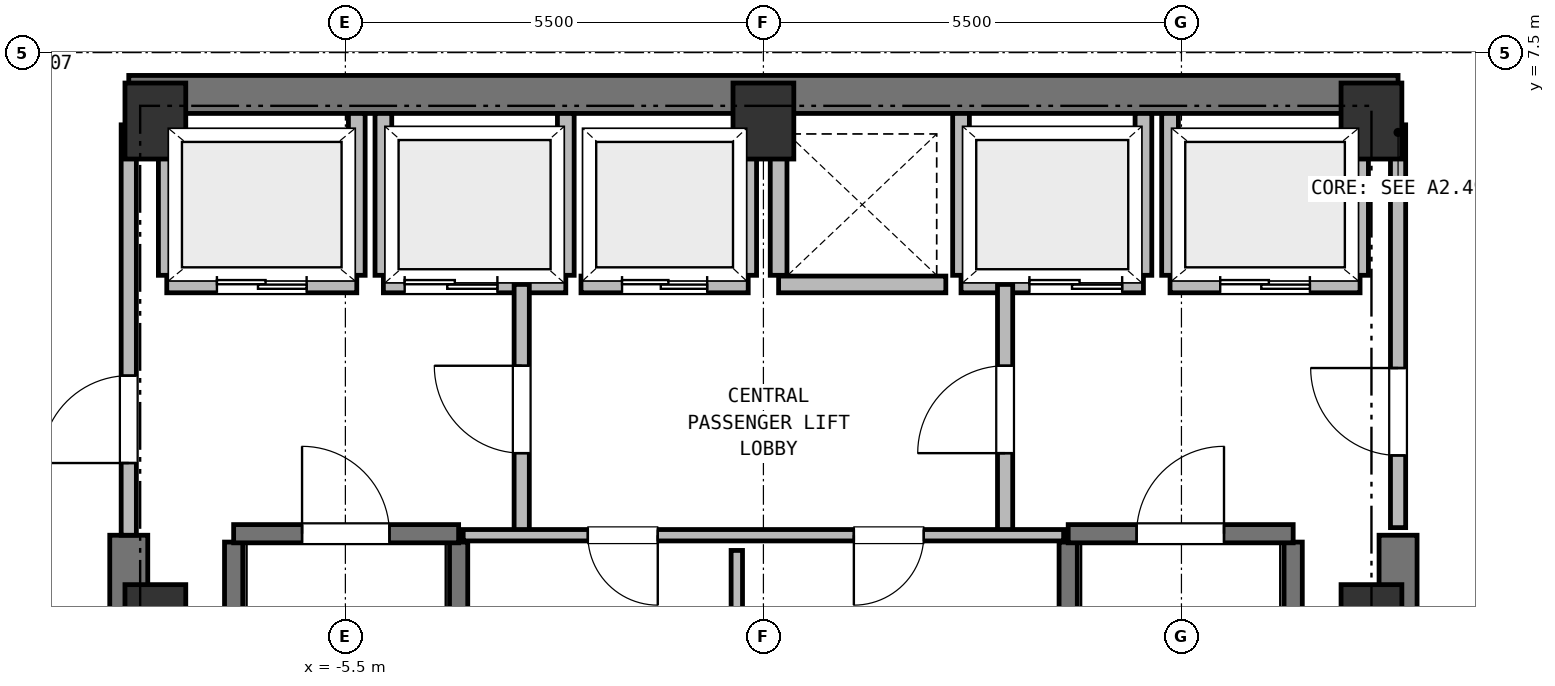
"""IFC4 building model, lengths in metres.
Left out: names, types, materials, properties, quantities, classifications, styles, units other than length and angle.
Written with IfcOpenShell. Run it as: python <this file> out.ifc"""

import sys

from ifc_helpers import new_model, si_unit, direction, frame, frame_2d, origin, origin_2d, place, context, subcontext, project, spatial, rectangle, extrude, element, fill, save


model = new_model("IFC4")
c1 = context("Model", 3, precision=1e-05, world=origin(), true_north=direction((0.0, 1.0)))
c2 = subcontext(c1, "Body", "Model", "MODEL_VIEW")
j1 = project(units=[si_unit("LENGTHUNIT", "METRE"), si_unit("PLANEANGLEUNIT", "RADIAN")], contexts=[c1])
p1 = place(None, origin())
s1 = spatial("IfcSite", under=j1, at=p1, CompositionType="ELEMENT")
p2 = place(p1, origin())
s2 = spatial("IfcBuilding", under=s1, at=p2, CompositionType="ELEMENT")
p3 = place(p2, frame((0.0, 0.0, 182.75)))
s3 = spatial("IfcBuildingStorey", under=s2, at=p3, CompositionType="ELEMENT", Elevation=182.75)
for number, where, z_axis, x_axis in (
    (1, (8.0, 0.0, 0.0), (0.0, 0.0, 1.0), (1.0, 0.0, 0.0)),
    (2, (8.0, 6.6, 0.0), (0.0, 0.0, 1.0), (1.0, 0.0, 0.0)),
    (3, (0.0, 6.6, 0.0), (0.0, 0.0, 1.0), (1.0, 0.0, 0.0)),
    (4, (-8.0, 6.6, 0.0), (0.0, 0.0, 1.0), (1.0, 0.0, 0.0)),
    (5, (-8.0, 0.0, 0.0), (0.0, 0.0, 1.0), (1.0, 0.0, 0.0)),
):
    element("IfcColumn", number, at=place(p3, frame(where, z_axis=z_axis, x_axis=x_axis)), inside=s3, PredefinedType="COLUMN", context=c2, shape_type="SweptSolid", body=[
        extrude(rectangle(XDim=0.8, YDim=1.0, at=origin_2d()), origin(), (0.0, 0.0, 1.0), 3.8),
    ])
p4 = place(p3, frame((-8.35, 6.95, 0.0), z_axis=(0.0, 0.0, 1.0), x_axis=(1.0, 0.0, 0.0)))
e6 = element("IfcWall", 6, at=p4, inside=s3, PredefinedType="SHEAR", context=c2, shape_type="SweptSolid", body=[
    extrude(rectangle(XDim=16.7, YDim=0.5, at=frame_2d((8.35, 0.0))), origin(), (0.0, 0.0, 1.0), 3.55),
])
for number, where, z_axis, x_axis in (
    (7, (-8.35, -6.95, 0.0), (0.0, 0.0, 1.0), (0.0, 1.0, 0.0)),
    (8, (8.35, -6.95, 0.0), (0.0, 0.0, 1.0), (0.0, 1.0, 0.0)),
):
    element("IfcWall", number, at=place(p3, frame(where, z_axis=z_axis, x_axis=x_axis)), inside=s3, PredefinedType="SHEAR", context=c2, shape_type="SweptSolid", body=[
        extrude(rectangle(XDim=8.1, YDim=0.5, at=frame_2d((4.05, 0.0))), origin(), (0.0, 0.0, 1.0), 3.55),
    ])
for number, where, z_axis, x_axis in (
    (9, (-6.97, -6.16, 0.0), (0.0, 0.0, 1.0), (0.0, 1.0, 0.0)),
    (10, (-4.01, -6.16, 0.0), (0.0, 0.0, 1.0), (0.0, 1.0, 0.0)),
):
    element("IfcWall", number, at=place(p3, frame(where, z_axis=z_axis, x_axis=x_axis)), inside=s3, PredefinedType="SHEAR", context=c2, shape_type="SweptSolid", body=[
        extrude(rectangle(XDim=7.22, YDim=0.24, at=frame_2d((3.61, 0.0))), origin(), (0.0, 0.0, 1.0), 3.55),
    ])
p5 = place(p3, frame((-6.97, 1.17, 0.0), z_axis=(0.0, 0.0, 1.0), x_axis=(1.0, 0.0, 0.0)))
e11 = element("IfcWall", 11, at=p5, inside=s3, PredefinedType="SHEAR", context=c2, shape_type="SweptSolid", body=[
    extrude(rectangle(XDim=2.96, YDim=0.24, at=frame_2d((1.48, 0.0))), origin(), (0.0, 0.0, 1.0), 3.55),
])
p6 = place(p5, frame((0.9, 0.0, 0.0)))
e12 = element("IfcOpeningElement", 12, at=p6, cuts=e11, PredefinedType="OPENING", context=c2, shape_type="SweptSolid", body=[
    extrude(rectangle(XDim=1.15, YDim=2.15, at=frame_2d((0.575, 1.075))), frame((0.0, 0.13, 0.0), z_axis=(0.0, -1.0, 0.0), x_axis=(1.0, 0.0, 0.0)), (0.0, 0.0, 1.0), 0.26),
])
for number, where, z_axis, x_axis in (
    (13, (4.01, -6.16, 0.0), (0.0, 0.0, 1.0), (0.0, 1.0, 0.0)),
    (14, (6.97, -6.16, 0.0), (0.0, 0.0, 1.0), (0.0, 1.0, 0.0)),
):
    element("IfcWall", number, at=place(p3, frame(where, z_axis=z_axis, x_axis=x_axis)), inside=s3, PredefinedType="SHEAR", context=c2, shape_type="SweptSolid", body=[
        extrude(rectangle(XDim=7.22, YDim=0.24, at=frame_2d((3.61, 0.0))), origin(), (0.0, 0.0, 1.0), 3.55),
    ])
p7 = place(p3, frame((4.01, 1.17, 0.0), z_axis=(0.0, 0.0, 1.0), x_axis=(1.0, 0.0, 0.0)))
e15 = element("IfcWall", 15, at=p7, inside=s3, PredefinedType="SHEAR", context=c2, shape_type="SweptSolid", body=[
    extrude(rectangle(XDim=2.96, YDim=0.24, at=frame_2d((1.48, 0.0))), origin(), (0.0, 0.0, 1.0), 3.55),
])
p8 = place(p7, frame((0.9, 0.0, 0.0)))
e16 = element("IfcOpeningElement", 16, at=p8, cuts=e15, PredefinedType="OPENING", context=c2, shape_type="SweptSolid", body=[
    extrude(rectangle(XDim=1.15, YDim=2.15, at=frame_2d((0.575, 1.075))), frame((0.0, 0.13, 0.0), z_axis=(0.0, -1.0, 0.0), x_axis=(1.0, 0.0, 0.0)), (0.0, 0.0, 1.0), 0.26),
])
p9 = place(p3, frame((-7.85, 4.45, 0.0), z_axis=(0.0, 0.0, 1.0), x_axis=(1.0, 0.0, 0.0)))
e17 = element("IfcWall", 17, at=p9, inside=s3, PredefinedType="PARTITIONING", context=c2, shape_type="SweptSolid", body=[
    extrude(rectangle(XDim=2.5, YDim=0.22, at=frame_2d((1.25, 0.0))), origin(), (0.0, 0.0, 1.0), 3.55),
])
p10 = place(p9, frame((0.66, 0.0, 0.0)))
e18 = element("IfcOpeningElement", 18, at=p10, cuts=e17, PredefinedType="OPENING", context=c2, shape_type="SweptSolid", body=[
    extrude(rectangle(XDim=1.18, YDim=2.15, at=frame_2d((0.59, 1.075))), frame((0.0, 0.12, 0.0), z_axis=(0.0, -1.0, 0.0), x_axis=(1.0, 0.0, 0.0)), (0.0, 0.0, 1.0), 0.24),
])
p11 = place(p3, frame((-7.85, 4.57, 0.0), z_axis=(0.0, 0.0, 1.0), x_axis=(0.0, 1.0, 0.0)))
e19 = element("IfcWall", 19, at=p11, inside=s3, PredefinedType="PARTITIONING", context=c2, shape_type="SweptSolid", body=[
    extrude(rectangle(XDim=2.13, YDim=0.22, at=frame_2d((1.065, 0.0))), origin(), (0.0, 0.0, 1.0), 3.18),
])
p12 = place(p3, frame((-5.35, 4.57, 0.0), z_axis=(0.0, 0.0, 1.0), x_axis=(0.0, 1.0, 0.0)))
e20 = element("IfcWall", 20, at=p12, inside=s3, PredefinedType="PARTITIONING", context=c2, shape_type="SweptSolid", body=[
    extrude(rectangle(XDim=2.13, YDim=0.22, at=frame_2d((1.065, 0.0))), origin(), (0.0, 0.0, 1.0), 3.55),
])
p13 = place(p3, frame((5.35, 4.45, 0.0), z_axis=(0.0, 0.0, 1.0), x_axis=(1.0, 0.0, 0.0)))
e21 = element("IfcWall", 21, at=p13, inside=s3, PredefinedType="PARTITIONING", context=c2, shape_type="SweptSolid", body=[
    extrude(rectangle(XDim=2.5, YDim=0.22, at=frame_2d((1.25, 0.0))), origin(), (0.0, 0.0, 1.0), 3.55),
])
p14 = place(p13, frame((0.66, 0.0, 0.0)))
e22 = element("IfcOpeningElement", 22, at=p14, cuts=e21, PredefinedType="OPENING", context=c2, shape_type="SweptSolid", body=[
    extrude(rectangle(XDim=1.18, YDim=2.15, at=frame_2d((0.59, 1.075))), frame((0.0, 0.12, 0.0), z_axis=(0.0, -1.0, 0.0), x_axis=(1.0, 0.0, 0.0)), (0.0, 0.0, 1.0), 0.24),
])
p15 = place(p3, frame((5.35, 4.57, 0.0), z_axis=(0.0, 0.0, 1.0), x_axis=(0.0, 1.0, 0.0)))
e23 = element("IfcWall", 23, at=p15, inside=s3, PredefinedType="PARTITIONING", context=c2, shape_type="SweptSolid", body=[
    extrude(rectangle(XDim=2.13, YDim=0.22, at=frame_2d((1.065, 0.0))), origin(), (0.0, 0.0, 1.0), 3.55),
])
p16 = place(p3, frame((7.85, 4.57, 0.0), z_axis=(0.0, 0.0, 1.0), x_axis=(0.0, 1.0, 0.0)))
e24 = element("IfcWall", 24, at=p16, inside=s3, PredefinedType="PARTITIONING", context=c2, shape_type="SweptSolid", body=[
    extrude(rectangle(XDim=2.13, YDim=0.22, at=frame_2d((1.065, 0.0))), origin(), (0.0, 0.0, 1.0), 3.18),
])
p17 = place(p3, frame((-5.0, 4.45, 0.0), z_axis=(0.0, 0.0, 1.0), x_axis=(1.0, 0.0, 0.0)))
e25 = element("IfcWall", 25, at=p17, inside=s3, PredefinedType="PARTITIONING", context=c2, shape_type="SweptSolid", body=[
    extrude(rectangle(XDim=2.4, YDim=0.22, at=frame_2d((1.2, 0.0))), origin(), (0.0, 0.0, 1.0), 3.55),
])
p18 = place(p17, frame((0.28, 0.0, 0.0)))
e26 = element("IfcOpeningElement", 26, at=p18, cuts=e25, PredefinedType="OPENING", context=c2, shape_type="SweptSolid", body=[
    extrude(rectangle(XDim=1.22, YDim=2.15, at=frame_2d((0.61, 1.075))), frame((0.0, 0.12, 0.0), z_axis=(0.0, -1.0, 0.0), x_axis=(1.0, 0.0, 0.0)), (0.0, 0.0, 1.0), 0.24),
])
for number, where, z_axis, x_axis in (
    (27, (-5.0, 4.57, 0.0), (0.0, 0.0, 1.0), (0.0, 1.0, 0.0)),
    (28, (-2.6, 4.57, 0.0), (0.0, 0.0, 1.0), (0.0, 1.0, 0.0)),
):
    element("IfcWall", number, at=place(p3, frame(where, z_axis=z_axis, x_axis=x_axis)), inside=s3, PredefinedType="PARTITIONING", context=c2, shape_type="SweptSolid", body=[
        extrude(rectangle(XDim=2.13, YDim=0.22, at=frame_2d((1.065, 0.0))), origin(), (0.0, 0.0, 1.0), 3.55),
    ])
p19 = place(p3, frame((2.6, 4.45, 0.0), z_axis=(0.0, 0.0, 1.0), x_axis=(1.0, 0.0, 0.0)))
e29 = element("IfcWall", 29, at=p19, inside=s3, PredefinedType="PARTITIONING", context=c2, shape_type="SweptSolid", body=[
    extrude(rectangle(XDim=2.4, YDim=0.22, at=frame_2d((1.2, 0.0))), origin(), (0.0, 0.0, 1.0), 3.55),
])
p20 = place(p19, frame((0.9, 0.0, 0.0)))
e30 = element("IfcOpeningElement", 30, at=p20, cuts=e29, PredefinedType="OPENING", context=c2, shape_type="SweptSolid", body=[
    extrude(rectangle(XDim=1.22, YDim=2.15, at=frame_2d((0.61, 1.075))), frame((0.0, 0.12, 0.0), z_axis=(0.0, -1.0, 0.0), x_axis=(1.0, 0.0, 0.0)), (0.0, 0.0, 1.0), 0.24),
])
for number, where, z_axis, x_axis in (
    (31, (2.6, 4.57, 0.0), (0.0, 0.0, 1.0), (0.0, 1.0, 0.0)),
    (32, (5.0, 4.57, 0.0), (0.0, 0.0, 1.0), (0.0, 1.0, 0.0)),
):
    element("IfcWall", number, at=place(p3, frame(where, z_axis=z_axis, x_axis=x_axis)), inside=s3, PredefinedType="PARTITIONING", context=c2, shape_type="SweptSolid", body=[
        extrude(rectangle(XDim=2.13, YDim=0.22, at=frame_2d((1.065, 0.0))), origin(), (0.0, 0.0, 1.0), 3.55),
    ])
p21 = place(p3, frame((-2.4, 4.45, 0.0), z_axis=(0.0, 0.0, 1.0), x_axis=(1.0, 0.0, 0.0)))
e33 = element("IfcWall", 33, at=p21, inside=s3, PredefinedType="PARTITIONING", context=c2, shape_type="SweptSolid", body=[
    extrude(rectangle(XDim=2.2, YDim=0.22, at=frame_2d((1.1, 0.0))), origin(), (0.0, 0.0, 1.0), 3.55),
])
p22 = place(p21, frame((0.54, 0.0, 0.0)))
e34 = element("IfcOpeningElement", 34, at=p22, cuts=e33, PredefinedType="OPENING", context=c2, shape_type="SweptSolid", body=[
    extrude(rectangle(XDim=1.12, YDim=2.15, at=frame_2d((0.56, 1.075))), frame((0.0, 0.12, 0.0), z_axis=(0.0, -1.0, 0.0), x_axis=(1.0, 0.0, 0.0)), (0.0, 0.0, 1.0), 0.24),
])
p23 = place(p3, frame((-0.2, 4.57, 0.0), z_axis=(0.0, 0.0, 1.0), x_axis=(0.0, 1.0, 0.0)))
e35 = element("IfcWall", 35, at=p23, inside=s3, PredefinedType="PARTITIONING", context=c2, shape_type="SweptSolid", body=[
    extrude(rectangle(XDim=2.13, YDim=0.22, at=frame_2d((1.065, 0.0))), origin(), (0.0, 0.0, 1.0), 3.55),
])
p24 = place(p3, frame((0.2, 4.45, 0.0), z_axis=(0.0, 0.0, 1.0), x_axis=(1.0, 0.0, 0.0)))
e36 = element("IfcWall", 36, at=p24, inside=s3, PredefinedType="PARTITIONING", context=c2, shape_type="SweptSolid", body=[
    extrude(rectangle(XDim=2.2, YDim=0.22, at=frame_2d((1.1, 0.0))), origin(), (0.0, 0.0, 1.0), 3.55),
])
p25 = place(p3, frame((0.2, 4.57, 0.0), z_axis=(0.0, 0.0, 1.0), x_axis=(0.0, 1.0, 0.0)))
e37 = element("IfcWall", 37, at=p25, inside=s3, PredefinedType="PARTITIONING", context=c2, shape_type="SweptSolid", body=[
    extrude(rectangle(XDim=2.13, YDim=0.22, at=frame_2d((1.065, 0.0))), origin(), (0.0, 0.0, 1.0), 3.55),
])
p26 = place(p3, frame((-3.18, 1.15, 0.0), z_axis=(0.0, 0.0, 1.0), x_axis=(0.0, 1.0, 0.0)))
e38 = element("IfcWall", 38, at=p26, inside=s3, PredefinedType="PARTITIONING", context=c2, shape_type="SweptSolid", body=[
    extrude(rectangle(XDim=3.3, YDim=0.2, at=frame_2d((1.65, 0.0))), origin(), (0.0, 0.0, 1.0), 3.55),
])
p27 = place(p26, frame((1.08, 0.0, 0.0)))
e39 = element("IfcOpeningElement", 39, at=p27, cuts=e38, PredefinedType="OPENING", context=c2, shape_type="SweptSolid", body=[
    extrude(rectangle(XDim=1.15, YDim=2.15, at=frame_2d((0.575, 1.075))), frame((0.0, 0.11, 0.0), z_axis=(0.0, -1.0, 0.0), x_axis=(1.0, 0.0, 0.0)), (0.0, 0.0, 1.0), 0.22),
])
p28 = place(p3, frame((3.18, 1.15, 0.0), z_axis=(0.0, 0.0, 1.0), x_axis=(0.0, 1.0, 0.0)))
e40 = element("IfcWall", 40, at=p28, inside=s3, PredefinedType="PARTITIONING", context=c2, shape_type="SweptSolid", body=[
    extrude(rectangle(XDim=3.3, YDim=0.2, at=frame_2d((1.65, 0.0))), origin(), (0.0, 0.0, 1.0), 3.55),
])
p29 = place(p28, frame((1.08, 0.0, 0.0)))
e41 = element("IfcOpeningElement", 41, at=p29, cuts=e40, PredefinedType="OPENING", context=c2, shape_type="SweptSolid", body=[
    extrude(rectangle(XDim=1.15, YDim=2.15, at=frame_2d((0.575, 1.075))), frame((0.0, 0.11, 0.0), z_axis=(0.0, -1.0, 0.0), x_axis=(1.0, 0.0, 0.0)), (0.0, 0.0, 1.0), 0.22),
])
p30 = place(p3, frame((-8.35, 1.15, 0.0), z_axis=(0.0, 0.0, 1.0), x_axis=(0.0, 1.0, 0.0)))
e42 = element("IfcWall", 42, at=p30, inside=s3, PredefinedType="PARTITIONING", context=c2, shape_type="SweptSolid", body=[
    extrude(rectangle(XDim=5.4, YDim=0.2, at=frame_2d((2.7, 0.0))), origin(), (0.0, 0.0, 1.0), 3.55),
])
p31 = place(p30, frame((0.95, 0.0, 0.0)))
e43 = element("IfcOpeningElement", 43, at=p31, cuts=e42, PredefinedType="OPENING", context=c2, shape_type="SweptSolid", body=[
    extrude(rectangle(XDim=1.15, YDim=2.15, at=frame_2d((0.575, 1.075))), frame((0.0, 0.11, 0.0), z_axis=(0.0, -1.0, 0.0), x_axis=(1.0, 0.0, 0.0)), (0.0, 0.0, 1.0), 0.22),
])
p32 = place(p3, frame((8.35, 1.25, 0.0), z_axis=(0.0, 0.0, 1.0), x_axis=(0.0, 1.0, 0.0)))
e44 = element("IfcWall", 44, at=p32, inside=s3, PredefinedType="PARTITIONING", context=c2, shape_type="SweptSolid", body=[
    extrude(rectangle(XDim=5.3, YDim=0.2, at=frame_2d((2.65, 0.0))), origin(), (0.0, 0.0, 1.0), 3.55),
])
p33 = place(p32, frame((0.95, 0.0, 0.0)))
e45 = element("IfcOpeningElement", 45, at=p33, cuts=e44, PredefinedType="OPENING", context=c2, shape_type="SweptSolid", body=[
    extrude(rectangle(XDim=1.15, YDim=2.15, at=frame_2d((0.575, 1.075))), frame((0.0, 0.11, 0.0), z_axis=(0.0, -1.0, 0.0), x_axis=(1.0, 0.0, 0.0)), (0.0, 0.0, 1.0), 0.22),
])
p34 = place(p3, frame((3.95, 1.15, 0.0), z_axis=(0.0, 0.0, 1.0), x_axis=(-1.0, 0.0, 0.0)))
e46 = element("IfcWall", 46, at=p34, inside=s3, PredefinedType="PARTITIONING", context=c2, shape_type="SweptSolid", body=[
    extrude(rectangle(XDim=7.9, YDim=0.15, at=frame_2d((3.95, 0.0))), origin(), (0.0, 0.0, 1.0), 3.55),
])
p35 = place(p34, frame((5.34, 0.0, 0.0)))
e47 = element("IfcOpeningElement", 47, at=p35, cuts=e46, PredefinedType="OPENING", context=c2, shape_type="SweptSolid", body=[
    extrude(rectangle(XDim=0.92, YDim=2.05, at=frame_2d((0.46, 1.025))), frame((0.0, 0.085, 0.0), z_axis=(0.0, -1.0, 0.0), x_axis=(1.0, 0.0, 0.0)), (0.0, 0.0, 1.0), 0.17),
])
p36 = place(p34, frame((1.84, 0.0, 0.0)))
e48 = element("IfcOpeningElement", 48, at=p36, cuts=e46, PredefinedType="OPENING", context=c2, shape_type="SweptSolid", body=[
    extrude(rectangle(XDim=0.92, YDim=2.05, at=frame_2d((0.46, 1.025))), frame((0.0, 0.085, 0.0), z_axis=(0.0, -1.0, 0.0), x_axis=(1.0, 0.0, 0.0)), (0.0, 0.0, 1.0), 0.17),
])
p37 = place(p3, frame((-0.35, -1.73, 0.0), z_axis=(0.0, 0.0, 1.0), x_axis=(0.0, 1.0, 0.0)))
e49 = element("IfcWall", 49, at=p37, inside=s3, PredefinedType="PARTITIONING", context=c2, shape_type="SweptSolid", body=[
    extrude(rectangle(XDim=2.68, YDim=0.15, at=frame_2d((1.34, 0.0))), origin(), (0.0, 0.0, 1.0), 3.55),
])
p38 = place(p3, frame((8.648, 9.171, 0.0), z_axis=(0.0, 0.0, 1.0), x_axis=(0.689960858356, -0.723846678473, 0.0)))
e50 = element("IfcWall", 50, at=p38, inside=s3, PredefinedType="PARTITIONING", context=c2, shape_type="SweptSolid", body=[
    extrude(rectangle(XDim=2.572, YDim=0.15, at=frame_2d((1.286, 0.0))), origin(), (0.0, 0.0, 1.0), 3.55),
])
p39 = place(p3, frame((-10.422, 7.309, 0.0), z_axis=(0.0, 0.0, 1.0), x_axis=(0.689960858356, 0.723846678473, 0.0)))
e51 = element("IfcWall", 51, at=p39, inside=s3, PredefinedType="PARTITIONING", context=c2, shape_type="SweptSolid", body=[
    extrude(rectangle(XDim=2.572, YDim=0.15, at=frame_2d((1.286, 0.0))), origin(), (0.0, 0.0, 1.0), 3.55),
])
p40 = place(p39, frame((0.796, 0.0, 0.0)))
e52 = element("IfcOpeningElement", 52, at=p40, cuts=e51, PredefinedType="OPENING", context=c2, shape_type="SweptSolid", body=[
    extrude(rectangle(XDim=1.06, YDim=2.15, at=frame_2d((0.53, 1.075))), frame((0.0, 0.085, 0.0), z_axis=(0.0, -1.0, 0.0), x_axis=(1.0, 0.0, 0.0)), (0.0, 0.0, 1.0), 0.17),
])
p41 = place(p6, origin())
e53 = element("IfcDoor", 53, at=p41, inside=s3, OperationType="SINGLE_SWING_LEFT", PredefinedType="DOOR", context=c2, shape_type="SweptSolid", body=[
    extrude(rectangle(XDim=1.15, YDim=2.15, at=frame_2d((0.575, 1.075))), frame((0.0, 0.025, 0.0), z_axis=(0.0, -1.0, 0.0), x_axis=(1.0, 0.0, 0.0)), (0.0, 0.0, 1.0), 0.05),
])
fill(e12, e53)
p42 = place(p8, origin())
e54 = element("IfcDoor", 54, at=p42, inside=s3, OperationType="SINGLE_SWING_RIGHT", PredefinedType="DOOR", context=c2, shape_type="SweptSolid", body=[
    extrude(rectangle(XDim=1.15, YDim=2.15, at=frame_2d((0.575, 1.075))), frame((0.0, 0.025, 0.0), z_axis=(0.0, -1.0, 0.0), x_axis=(1.0, 0.0, 0.0)), (0.0, 0.0, 1.0), 0.05),
])
fill(e16, e54)
p43 = place(p10, origin())
e55 = element("IfcDoor", 55, at=p43, inside=s3, OperationType="DOUBLE_DOOR_SLIDING", PredefinedType="DOOR", context=c2, shape_type="SweptSolid", body=[
    extrude(rectangle(XDim=1.18, YDim=2.15, at=frame_2d((0.59, 1.075))), frame((0.0, 0.025, 0.0), z_axis=(0.0, -1.0, 0.0), x_axis=(1.0, 0.0, 0.0)), (0.0, 0.0, 1.0), 0.05),
])
fill(e18, e55)
p44 = place(p14, origin())
e56 = element("IfcDoor", 56, at=p44, inside=s3, OperationType="DOUBLE_DOOR_SLIDING", PredefinedType="DOOR", context=c2, shape_type="SweptSolid", body=[
    extrude(rectangle(XDim=1.18, YDim=2.15, at=frame_2d((0.59, 1.075))), frame((0.0, 0.025, 0.0), z_axis=(0.0, -1.0, 0.0), x_axis=(1.0, 0.0, 0.0)), (0.0, 0.0, 1.0), 0.05),
])
fill(e22, e56)
p45 = place(p18, origin())
e57 = element("IfcDoor", 57, at=p45, inside=s3, OperationType="DOUBLE_DOOR_SLIDING", PredefinedType="DOOR", context=c2, shape_type="SweptSolid", body=[
    extrude(rectangle(XDim=1.22, YDim=2.15, at=frame_2d((0.61, 1.075))), frame((0.0, 0.025, 0.0), z_axis=(0.0, -1.0, 0.0), x_axis=(1.0, 0.0, 0.0)), (0.0, 0.0, 1.0), 0.05),
])
fill(e26, e57)
p46 = place(p20, origin())
e58 = element("IfcDoor", 58, at=p46, inside=s3, OperationType="DOUBLE_DOOR_SLIDING", PredefinedType="DOOR", context=c2, shape_type="SweptSolid", body=[
    extrude(rectangle(XDim=1.22, YDim=2.15, at=frame_2d((0.61, 1.075))), frame((0.0, 0.025, 0.0), z_axis=(0.0, -1.0, 0.0), x_axis=(1.0, 0.0, 0.0)), (0.0, 0.0, 1.0), 0.05),
])
fill(e30, e58)
p47 = place(p22, origin())
e59 = element("IfcDoor", 59, at=p47, inside=s3, OperationType="DOUBLE_DOOR_SLIDING", PredefinedType="DOOR", context=c2, shape_type="SweptSolid", body=[
    extrude(rectangle(XDim=1.12, YDim=2.15, at=frame_2d((0.56, 1.075))), frame((0.0, 0.025, 0.0), z_axis=(0.0, -1.0, 0.0), x_axis=(1.0, 0.0, 0.0)), (0.0, 0.0, 1.0), 0.05),
])
fill(e34, e59)
p48 = place(p27, origin())
e60 = element("IfcDoor", 60, at=p48, inside=s3, OperationType="SINGLE_SWING_RIGHT", PredefinedType="DOOR", context=c2, shape_type="SweptSolid", body=[
    extrude(rectangle(XDim=1.15, YDim=2.15, at=frame_2d((0.575, 1.075))), frame((0.0, 0.025, 0.0), z_axis=(0.0, -1.0, 0.0), x_axis=(1.0, 0.0, 0.0)), (0.0, 0.0, 1.0), 0.05),
])
fill(e39, e60)
p49 = place(p29, origin())
e61 = element("IfcDoor", 61, at=p49, inside=s3, OperationType="SINGLE_SWING_LEFT", PredefinedType="DOOR", context=c2, shape_type="SweptSolid", body=[
    extrude(rectangle(XDim=1.15, YDim=2.15, at=frame_2d((0.575, 1.075))), frame((0.0, 0.025, 0.0), z_axis=(0.0, -1.0, 0.0), x_axis=(1.0, 0.0, 0.0)), (0.0, 0.0, 1.0), 0.05),
])
fill(e41, e61)
p50 = place(p31, origin())
e62 = element("IfcDoor", 62, at=p50, inside=s3, OperationType="SINGLE_SWING_LEFT", PredefinedType="DOOR", context=c2, shape_type="SweptSolid", body=[
    extrude(rectangle(XDim=1.15, YDim=2.15, at=frame_2d((0.575, 1.075))), frame((0.0, 0.025, 0.0), z_axis=(0.0, -1.0, 0.0), x_axis=(1.0, 0.0, 0.0)), (0.0, 0.0, 1.0), 0.05),
])
fill(e43, e62)
p51 = place(p33, origin())
e63 = element("IfcDoor", 63, at=p51, inside=s3, OperationType="SINGLE_SWING_RIGHT", PredefinedType="DOOR", context=c2, shape_type="SweptSolid", body=[
    extrude(rectangle(XDim=1.15, YDim=2.15, at=frame_2d((0.575, 1.075))), frame((0.0, 0.025, 0.0), z_axis=(0.0, -1.0, 0.0), x_axis=(1.0, 0.0, 0.0)), (0.0, 0.0, 1.0), 0.05),
])
fill(e45, e63)
p52 = place(p35, origin())
e64 = element("IfcDoor", 64, at=p52, inside=s3, OperationType="SINGLE_SWING_LEFT", PredefinedType="DOOR", context=c2, shape_type="SweptSolid", body=[
    extrude(rectangle(XDim=0.92, YDim=2.05, at=frame_2d((0.46, 1.025))), frame((0.0, 0.025, 0.0), z_axis=(0.0, -1.0, 0.0), x_axis=(1.0, 0.0, 0.0)), (0.0, 0.0, 1.0), 0.05),
])
fill(e47, e64)
p53 = place(p36, origin())
e65 = element("IfcDoor", 65, at=p53, inside=s3, OperationType="SINGLE_SWING_RIGHT", PredefinedType="DOOR", context=c2, shape_type="SweptSolid", body=[
    extrude(rectangle(XDim=0.92, YDim=2.05, at=frame_2d((0.46, 1.025))), frame((0.0, 0.025, 0.0), z_axis=(0.0, -1.0, 0.0), x_axis=(1.0, 0.0, 0.0)), (0.0, 0.0, 1.0), 0.05),
])
fill(e48, e65)
save(model, sys.argv[1])
